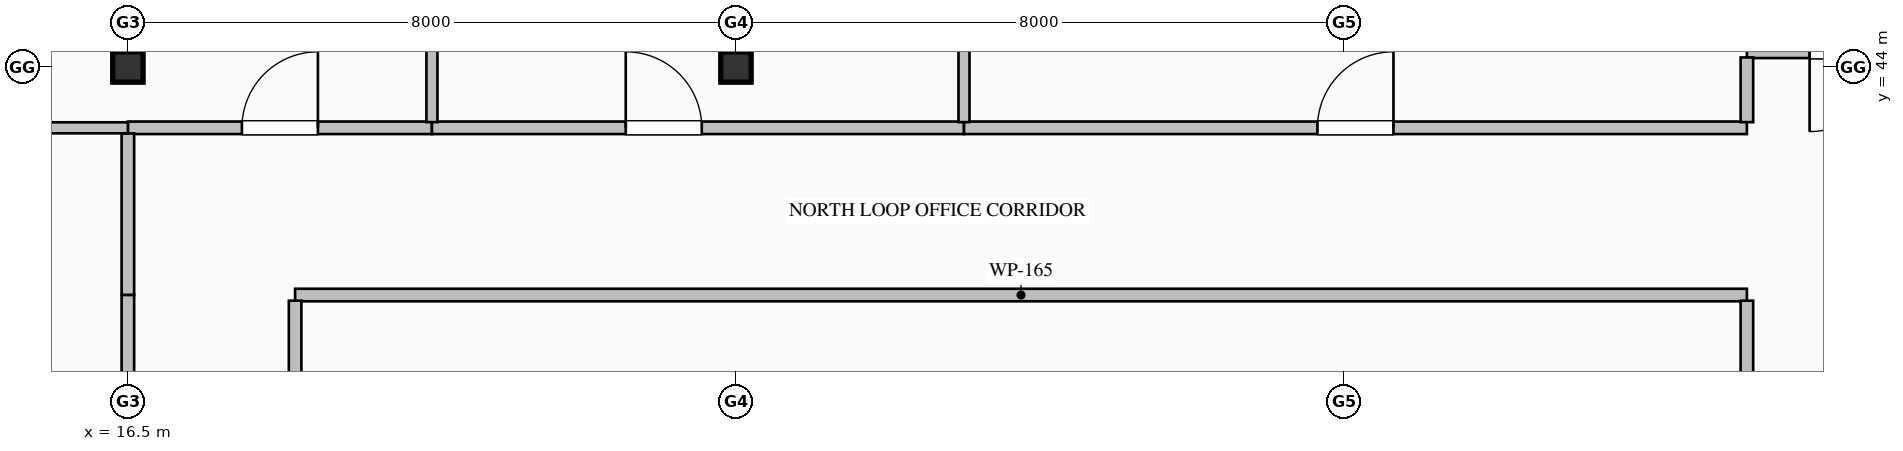
"""IFC4 building model, lengths in metres.
Left out: names, types, materials, properties, quantities, classifications, styles, units other than length and angle.
Written with IfcOpenShell. Run it as: python <this file> out.ifc"""

import sys

from ifc_helpers import new_model, si_unit, direction, frame, frame_2d, origin, origin_2d, place, context, subcontext, project, spatial, rectangle, i_section, extrude, element, fill, save


model = new_model("IFC4")
c1 = context("Model", 3, precision=1e-05, world=origin(), true_north=direction((0.0, 1.0)))
c2 = subcontext(c1, "Body", "Model", "MODEL_VIEW")
j1 = project(units=[si_unit("LENGTHUNIT", "METRE"), si_unit("PLANEANGLEUNIT", "RADIAN")], contexts=[c1])
p1 = place(None, origin())
s1 = spatial("IfcSite", under=j1, at=p1, CompositionType="ELEMENT")
p2 = place(p1, origin())
s2 = spatial("IfcBuilding", under=s1, at=p2, CompositionType="ELEMENT")
p3 = place(p2, frame((0.0, 0.0, 175.0)))
s3 = spatial("IfcBuildingStorey", under=s2, at=p3, CompositionType="ELEMENT", Elevation=175.0)
for number, where, z_axis, x_axis in (
    (1, (16.5, 44.0, 0.0), (0.0, 0.0, 1.0), (1.0, 0.0, 0.0)),
    (2, (24.5, 44.0, 0.0), (0.0, 0.0, 1.0), (1.0, 0.0, 0.0)),
):
    element("IfcColumn", number, at=place(p3, frame(where, z_axis=z_axis, x_axis=x_axis)), inside=s3, PredefinedType="COLUMN", context=c2, shape_type="SweptSolid", body=[
        extrude(i_section(OverallWidth=0.4, OverallDepth=0.4, WebThickness=0.013, FlangeThickness=0.021, FilletRadius=0.022, at=origin_2d()), origin(), (0.0, 0.0, 1.0), 4.0),
    ])
p4 = place(p3, frame((40.5, 44.2, 0.0), z_axis=(0.0, 0.0, 1.0), x_axis=(-1.0, 0.0, 0.0)))
e3 = element("IfcWall", 3, at=p4, inside=s3, PredefinedType="PARTITIONING", context=c2, shape_type="SweptSolid", body=[
    extrude(rectangle(XDim=2.7, YDim=0.165, at=frame_2d((1.35, 0.0))), origin(), (0.0, 0.0, 1.0), 3.765),
])
p5 = place(p4, frame((0.825, 0.0, 0.0)))
e4 = element("IfcOpeningElement", 4, at=p5, cuts=e3, PredefinedType="OPENING", context=c2, shape_type="SweptSolid", body=[
    extrude(rectangle(XDim=1.05, YDim=2.15, at=frame_2d((0.525, 1.075))), frame((0.0, 0.093, 0.0), z_axis=(0.0, -1.0, 0.0), x_axis=(1.0, 0.0, 0.0)), (0.0, 0.0, 1.0), 0.185),
])
p6 = place(p3, frame((16.5, 43.2, 0.0), z_axis=(0.0, 0.0, 1.0), x_axis=(1.0, 0.0, 0.0)))
e5 = element("IfcWall", 5, at=p6, inside=s3, PredefinedType="PARTITIONING", context=c2, shape_type="SweptSolid", body=[
    extrude(rectangle(XDim=4.0, YDim=0.165, at=frame_2d((2.0, 0.0))), origin(), (0.0, 0.0, 1.0), 3.765),
])
p7 = place(p6, frame((1.5, 0.0, 0.0)))
e6 = element("IfcOpeningElement", 6, at=p7, cuts=e5, PredefinedType="OPENING", context=c2, shape_type="SweptSolid", body=[
    extrude(rectangle(XDim=1.0, YDim=2.15, at=frame_2d((0.5, 1.075))), frame((0.0, 0.093, 0.0), z_axis=(0.0, -1.0, 0.0), x_axis=(1.0, 0.0, 0.0)), (0.0, 0.0, 1.0), 0.185),
])
p8 = place(p3, frame((20.5, 43.2, 0.0), z_axis=(0.0, 0.0, 1.0), x_axis=(1.0, 0.0, 0.0)))
e7 = element("IfcWall", 7, at=p8, inside=s3, PredefinedType="PARTITIONING", context=c2, shape_type="SweptSolid", body=[
    extrude(rectangle(XDim=7.0, YDim=0.165, at=frame_2d((3.5, 0.0))), origin(), (0.0, 0.0, 1.0), 3.765),
])
p9 = place(p8, frame((2.55, 0.0, 0.0)))
e8 = element("IfcOpeningElement", 8, at=p9, cuts=e7, PredefinedType="OPENING", context=c2, shape_type="SweptSolid", body=[
    extrude(rectangle(XDim=1.0, YDim=2.15, at=frame_2d((0.5, 1.075))), frame((0.0, 0.093, 0.0), z_axis=(0.0, -1.0, 0.0), x_axis=(1.0, 0.0, 0.0)), (0.0, 0.0, 1.0), 0.185),
])
p10 = place(p3, frame((27.5, 43.2, 0.0), z_axis=(0.0, 0.0, 1.0), x_axis=(1.0, 0.0, 0.0)))
e9 = element("IfcWall", 9, at=p10, inside=s3, PredefinedType="PARTITIONING", context=c2, shape_type="SweptSolid", body=[
    extrude(rectangle(XDim=10.3, YDim=0.165, at=frame_2d((5.15, 0.0))), origin(), (0.0, 0.0, 1.0), 3.765),
])
p11 = place(p10, frame((4.65, 0.0, 0.0)))
e10 = element("IfcOpeningElement", 10, at=p11, cuts=e9, PredefinedType="OPENING", context=c2, shape_type="SweptSolid", body=[
    extrude(rectangle(XDim=1.0, YDim=2.15, at=frame_2d((0.5, 1.075))), frame((0.0, 0.093, 0.0), z_axis=(0.0, -1.0, 0.0), x_axis=(1.0, 0.0, 0.0)), (0.0, 0.0, 1.0), 0.185),
])
p12 = place(p3, frame((37.8, 41.0, 0.0), z_axis=(0.0, 0.0, 1.0), x_axis=(-1.0, 0.0, 0.0)))
e11 = element("IfcWall", 11, at=p12, inside=s3, PredefinedType="PARTITIONING", context=c2, shape_type="SweptSolid", body=[
    extrude(rectangle(XDim=19.1, YDim=0.165, at=frame_2d((9.55, 0.0))), origin(), (0.0, 0.0, 1.0), 3.765),
])
p13 = place(p3, frame((16.5, 41.0, 0.0), z_axis=(0.0, 0.0, 1.0), x_axis=(0.0, 1.0, 0.0)))
e12 = element("IfcWall", 12, at=p13, inside=s3, PredefinedType="PARTITIONING", context=c2, shape_type="SweptSolid", body=[
    extrude(rectangle(XDim=2.125, YDim=0.165, at=frame_2d((1.063, 0.0))), origin(), (0.0, 0.0, 1.0), 3.157),
])
p14 = place(p3, frame((18.7, 40.926, 0.0), z_axis=(0.0, 0.0, 1.0), x_axis=(0.0, -1.0, 0.0)))
e13 = element("IfcWall", 13, at=p14, inside=s3, PredefinedType="PARTITIONING", context=c2, shape_type="SweptSolid", body=[
    extrude(rectangle(XDim=7.451, YDim=0.165, at=frame_2d((3.726, 0.0))), origin(), (0.0, 0.0, 1.0), 3.765),
])
p15 = place(p3, frame((16.5, 33.4, 0.0), z_axis=(0.0, 0.0, 1.0), x_axis=(0.0, 1.0, 0.0)))
e14 = element("IfcWall", 14, at=p15, inside=s3, PredefinedType="PARTITIONING", context=c2, shape_type="SweptSolid", body=[
    extrude(rectangle(XDim=7.6, YDim=0.165, at=frame_2d((3.8, 0.0))), origin(), (0.0, 0.0, 1.0), 3.157),
])
p16 = place(p15, frame((3.3, 0.0, 0.0)))
e15 = element("IfcOpeningElement", 15, at=p16, cuts=e14, PredefinedType="OPENING", context=c2, shape_type="SweptSolid", body=[
    extrude(rectangle(XDim=1.0, YDim=2.15, at=frame_2d((0.5, 1.075))), frame((0.0, 0.093, 0.0), z_axis=(0.0, -1.0, 0.0), x_axis=(1.0, 0.0, 0.0)), (0.0, 0.0, 1.0), 0.185),
])
p17 = place(p3, frame((37.8, 43.274, 0.0), z_axis=(0.0, 0.0, 1.0), x_axis=(0.0, 1.0, 0.0)))
e16 = element("IfcWall", 16, at=p17, inside=s3, PredefinedType="PARTITIONING", context=c2, shape_type="SweptSolid", body=[
    extrude(rectangle(XDim=0.851, YDim=0.165, at=frame_2d((0.426, 0.0))), origin(), (0.0, 0.0, 1.0), 3.765),
])
p18 = place(p3, frame((37.8, 33.475, 0.0), z_axis=(0.0, 0.0, 1.0), x_axis=(0.0, 1.0, 0.0)))
e17 = element("IfcWall", 17, at=p18, inside=s3, PredefinedType="PARTITIONING", context=c2, shape_type="SweptSolid", body=[
    extrude(rectangle(XDim=7.451, YDim=0.165, at=frame_2d((3.726, 0.0))), origin(), (0.0, 0.0, 1.0), 3.765),
])
p19 = place(p3, frame((20.5, 51.648, 0.0), z_axis=(0.0, 0.0, 1.0), x_axis=(0.0, -1.0, 0.0)))
e18 = element("IfcWall", 18, at=p19, inside=s3, PredefinedType="PARTITIONING", context=c2, shape_type="SweptSolid", body=[
    extrude(rectangle(XDim=8.374, YDim=0.145, at=frame_2d((4.187, 0.0))), origin(), (0.0, 0.0, 1.0), 3.765),
])
p20 = place(p3, frame((16.5, 43.2, 0.0), z_axis=(0.0, 0.0, 1.0), x_axis=(-1.0, 0.0, 0.0)))
e19 = element("IfcWall", 19, at=p20, inside=s3, PredefinedType="PARTITIONING", context=c2, shape_type="SweptSolid", body=[
    extrude(rectangle(XDim=3.5, YDim=0.145, at=frame_2d((1.75, 0.0))), origin(), (0.0, 0.0, 1.0), 3.765),
])
p21 = place(p3, frame((27.5, 51.648, 0.0), z_axis=(0.0, 0.0, 1.0), x_axis=(0.0, -1.0, 0.0)))
e20 = element("IfcWall", 20, at=p21, inside=s3, PredefinedType="PARTITIONING", context=c2, shape_type="SweptSolid", body=[
    extrude(rectangle(XDim=8.374, YDim=0.145, at=frame_2d((4.187, 0.0))), origin(), (0.0, 0.0, 1.0), 3.765),
])
p22 = place(p5, origin())
e21 = element("IfcDoor", 21, at=p22, inside=s3, OperationType="SINGLE_SWING_RIGHT", PredefinedType="DOOR", context=c2, shape_type="SweptSolid", body=[
    extrude(rectangle(XDim=1.05, YDim=2.15, at=frame_2d((0.525, 1.075))), frame((0.0, 0.025, 0.0), z_axis=(0.0, -1.0, 0.0), x_axis=(1.0, 0.0, 0.0)), (0.0, 0.0, 1.0), 0.05),
])
fill(e4, e21)
p23 = place(p7, origin())
e22 = element("IfcDoor", 22, at=p23, inside=s3, OperationType="SINGLE_SWING_RIGHT", PredefinedType="DOOR", context=c2, shape_type="SweptSolid", body=[
    extrude(rectangle(XDim=1.0, YDim=2.15, at=frame_2d((0.5, 1.075))), frame((0.0, 0.025, 0.0), z_axis=(0.0, -1.0, 0.0), x_axis=(1.0, 0.0, 0.0)), (0.0, 0.0, 1.0), 0.05),
])
fill(e6, e22)
p24 = place(p9, origin())
e23 = element("IfcDoor", 23, at=p24, inside=s3, OperationType="SINGLE_SWING_LEFT", PredefinedType="DOOR", context=c2, shape_type="SweptSolid", body=[
    extrude(rectangle(XDim=1.0, YDim=2.15, at=frame_2d((0.5, 1.075))), frame((0.0, 0.025, 0.0), z_axis=(0.0, -1.0, 0.0), x_axis=(1.0, 0.0, 0.0)), (0.0, 0.0, 1.0), 0.05),
])
fill(e8, e23)
p25 = place(p11, origin())
e24 = element("IfcDoor", 24, at=p25, inside=s3, OperationType="SINGLE_SWING_RIGHT", PredefinedType="DOOR", context=c2, shape_type="SweptSolid", body=[
    extrude(rectangle(XDim=1.0, YDim=2.15, at=frame_2d((0.5, 1.075))), frame((0.0, 0.025, 0.0), z_axis=(0.0, -1.0, 0.0), x_axis=(1.0, 0.0, 0.0)), (0.0, 0.0, 1.0), 0.05),
])
fill(e10, e24)
save(model, sys.argv[1])
